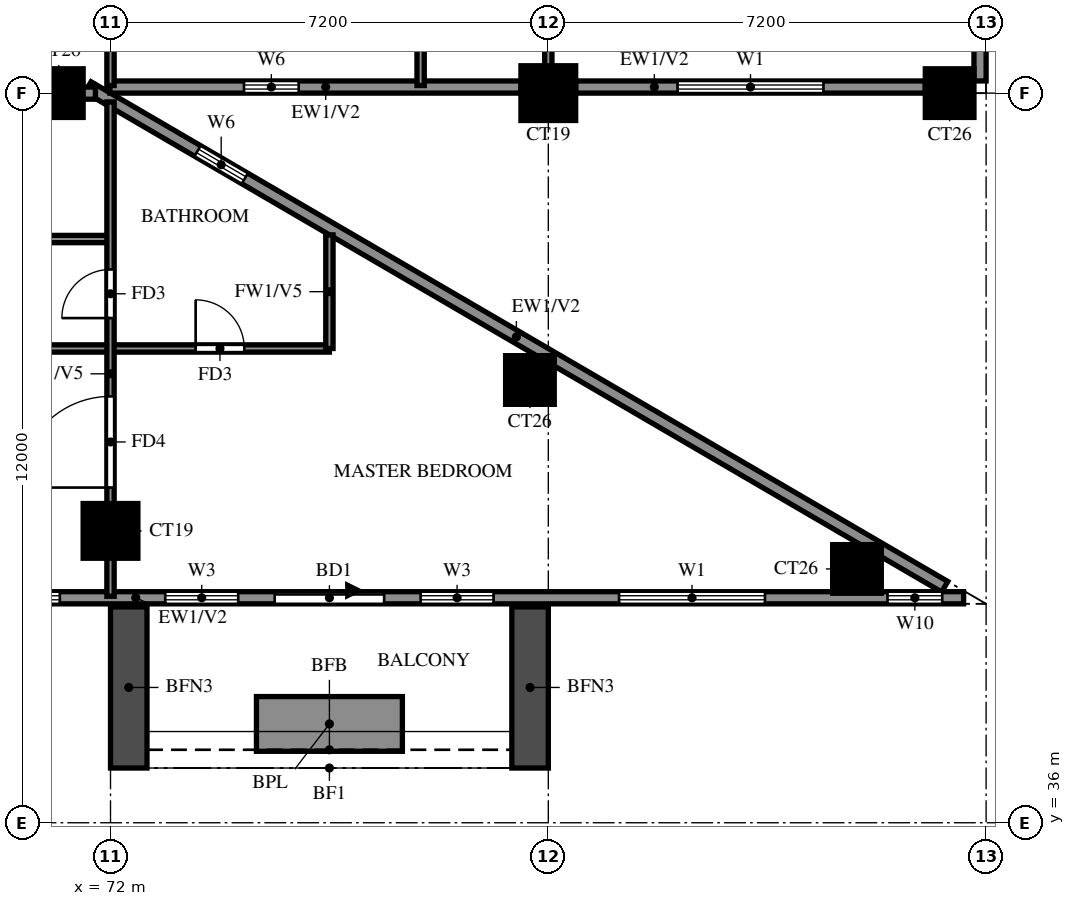
"""IFC4 building model, lengths in metres.
Left out: names, types, materials, properties, quantities, classifications, styles, units other than length and angle.
Written with IfcOpenShell. Run it as: python <this file> out.ifc"""

import sys

from ifc_helpers import new_model, si_unit, direction, frame, frame_2d, origin, origin_2d, place, context, subcontext, project, spatial, rectangle, extrude, source, transform, mapped, element, fill, save


model = new_model("IFC4")
c1 = context("Model", 3, precision=1e-05, world=origin(), true_north=direction((0.0, 1.0)))
c2 = subcontext(c1, "Body", "Model", "MODEL_VIEW")
j1 = project(units=[si_unit("LENGTHUNIT", "METRE"), si_unit("PLANEANGLEUNIT", "RADIAN")], contexts=[c1])
p1 = place(None, origin())
s1 = spatial("IfcSite", under=j1, at=p1, CompositionType="ELEMENT")
p2 = place(p1, origin())
s2 = spatial("IfcBuilding", under=s1, at=p2, CompositionType="ELEMENT")
p3 = place(p2, frame((0.0, 0.0, 199.0)))
s3 = spatial("IfcBuildingStorey", under=s2, at=p3, CompositionType="ELEMENT", Elevation=199.0)
m1 = source(origin(), c2, "Body", "SweptSolid", [
    extrude(rectangle(XDim=0.8, YDim=0.8, at=origin_2d()), origin(), (0.0, 0.0, 1.0), 3.2),
])
p4 = place(p3, frame((84.276, 40.174, 0.0), z_axis=(0.0, 0.0, 1.0), x_axis=(1.0, 0.0, 0.0)))
e1 = element("IfcColumn", 1, at=p4, inside=s3, PredefinedType="COLUMN", context=c2, shape_type="MappedRepresentation", body=[
    mapped(m1, transform((0.0, 0.0, 0.0))),
])
m2 = source(origin(), c2, "Body", "SweptSolid", [
    extrude(rectangle(XDim=0.9, YDim=0.9, at=origin_2d()), origin(), (0.0, 0.0, 1.0), 3.2),
])
p5 = place(p3, frame((72.0, 40.8, 0.0), z_axis=(0.0, 0.0, 1.0), x_axis=(1.0, 0.0, 0.0)))
e2 = element("IfcColumn", 2, at=p5, inside=s3, PredefinedType="COLUMN", context=c2, shape_type="MappedRepresentation", body=[
    mapped(m2, transform((0.0, 0.0, 0.0))),
])
for number, where, z_axis, x_axis in (
    (3, (78.898, 43.282, 0.0), (0.0, 0.0, 1.0), (1.0, 0.0, 0.0)),
    (4, (71.15, 48.0, 0.0), (0.0, 0.0, 1.0), (1.0, 0.0, 0.0)),
):
    element("IfcColumn", number, at=place(p3, frame(where, z_axis=z_axis, x_axis=x_axis)), inside=s3, PredefinedType="COLUMN", context=c2, shape_type="MappedRepresentation", body=[
        mapped(m1, transform((0.0, 0.0, 0.0))),
    ])
p6 = place(p3, frame((79.2, 48.0, 0.0), z_axis=(0.0, 0.0, 1.0), x_axis=(1.0, 0.0, 0.0)))
e5 = element("IfcColumn", 5, at=p6, inside=s3, PredefinedType="COLUMN", context=c2, shape_type="MappedRepresentation", body=[
    mapped(m2, transform((0.0, 0.0, 0.0))),
])
p7 = place(p3, frame((85.8, 48.0, 0.0), z_axis=(0.0, 0.0, 1.0), x_axis=(1.0, 0.0, 0.0)))
e6 = element("IfcColumn", 6, at=p7, inside=s3, PredefinedType="COLUMN", context=c2, shape_type="MappedRepresentation", body=[
    mapped(m1, transform((0.0, 0.0, 0.0))),
])
p8 = place(p3, frame((85.719, 39.881, 0.0), z_axis=(0.0, 0.0, 1.0), x_axis=(-0.86377618652, 0.503875678716, 0.0)))
e7 = element("IfcWall", 7, at=p8, inside=s3, PredefinedType="SOLIDWALL", context=c2, shape_type="SweptSolid", body=[
    extrude(rectangle(XDim=16.311, YDim=0.2, at=frame_2d((8.156, 0.0))), origin(), (0.0, 0.0, 1.0), 3.2),
])
p9 = place(p8, frame((13.326, 0.0, 1.5)))
e8 = element("IfcOpeningElement", 8, at=p9, cuts=e7, PredefinedType="OPENING", context=c2, shape_type="SweptSolid", body=[
    extrude(rectangle(XDim=0.9, YDim=0.9, at=frame_2d((0.45, 0.45))), frame((0.0, 0.11, 0.0), z_axis=(0.0, -1.0, 0.0), x_axis=(1.0, 0.0, 0.0)), (0.0, 0.0, 1.0), 0.22),
])
p10 = place(p3, frame((71.99, 48.1, 0.0), z_axis=(0.0, 0.0, 1.0), x_axis=(1.0, 0.0, 0.0)))
e9 = element("IfcWall", 9, at=p10, inside=s3, PredefinedType="SOLIDWALL", context=c2, shape_type="SweptSolid", body=[
    extrude(rectangle(XDim=6.76, YDim=0.2, at=frame_2d((3.38, 0.0))), origin(), (0.0, 0.0, 1.0), 3.2),
])
p11 = place(p10, frame((2.205, 0.0, 1.5)))
e10 = element("IfcOpeningElement", 10, at=p11, cuts=e9, PredefinedType="OPENING", context=c2, shape_type="SweptSolid", body=[
    extrude(rectangle(XDim=0.9, YDim=0.9, at=frame_2d((0.45, 0.45))), frame((0.0, 0.11, 0.0), z_axis=(0.0, -1.0, 0.0), x_axis=(1.0, 0.0, 0.0)), (0.0, 0.0, 1.0), 0.22),
])
p12 = place(p3, frame((79.65, 48.1, 0.0), z_axis=(0.0, 0.0, 1.0), x_axis=(1.0, 0.0, 0.0)))
e11 = element("IfcWall", 11, at=p12, inside=s3, PredefinedType="SOLIDWALL", context=c2, shape_type="SweptSolid", body=[
    extrude(rectangle(XDim=5.75, YDim=0.2, at=frame_2d((2.875, 0.0))), origin(), (0.0, 0.0, 1.0), 3.2),
])
p13 = place(p12, frame((1.675, 0.0, 0.6)))
e12 = element("IfcOpeningElement", 12, at=p13, cuts=e11, PredefinedType="OPENING", context=c2, shape_type="SweptSolid", body=[
    extrude(rectangle(XDim=2.4, YDim=2.4, at=frame_2d((1.2, 1.2))), frame((0.0, 0.11, 0.0), z_axis=(0.0, -1.0, 0.0), x_axis=(1.0, 0.0, 0.0)), (0.0, 0.0, 1.0), 0.22),
])
p14 = place(p3, frame((86.3, 48.2, 0.0), z_axis=(0.0, 0.0, 1.0), x_axis=(0.0, 1.0, 0.0)))
e13 = element("IfcWall", 13, at=p14, inside=s3, PredefinedType="SOLIDWALL", context=c2, shape_type="SweptSolid", body=[
    extrude(rectangle(XDim=28.6, YDim=0.2, at=frame_2d((14.3, 0.0))), origin(), (0.0, 0.0, 1.0), 3.2),
])
p15 = place(p14, frame((11.5, 0.0, 0.0)))
e14 = element("IfcOpeningElement", 14, at=p15, cuts=e13, PredefinedType="OPENING", context=c2, shape_type="SweptSolid", body=[
    extrude(rectangle(XDim=1.8, YDim=2.4, at=frame_2d((0.9, 1.2))), frame((0.0, 0.11, 0.0), z_axis=(0.0, -1.0, 0.0), x_axis=(1.0, 0.0, 0.0)), (0.0, 0.0, 1.0), 0.22),
])
p16 = place(p14, frame((0.6, 0.0, 0.6)))
e15 = element("IfcOpeningElement", 15, at=p16, cuts=e13, PredefinedType="OPENING", context=c2, shape_type="SweptSolid", body=[
    extrude(rectangle(XDim=2.4, YDim=2.4, at=frame_2d((1.2, 1.2))), frame((0.0, 0.11, 0.0), z_axis=(0.0, -1.0, 0.0), x_axis=(1.0, 0.0, 0.0)), (0.0, 0.0, 1.0), 0.22),
])
p17 = place(p14, frame((4.575, 0.0, 1.5)))
e16 = element("IfcOpeningElement", 16, at=p17, cuts=e13, PredefinedType="OPENING", context=c2, shape_type="SweptSolid", body=[
    extrude(rectangle(XDim=0.9, YDim=0.9, at=frame_2d((0.45, 0.45))), frame((0.0, 0.11, 0.0), z_axis=(0.0, -1.0, 0.0), x_axis=(1.0, 0.0, 0.0)), (0.0, 0.0, 1.0), 0.22),
])
p18 = place(p14, frame((7.475, 0.0, 0.6)))
e17 = element("IfcOpeningElement", 17, at=p18, cuts=e13, PredefinedType="OPENING", context=c2, shape_type="SweptSolid", body=[
    extrude(rectangle(XDim=1.8, YDim=2.4, at=frame_2d((0.9, 1.2))), frame((0.0, 0.11, 0.0), z_axis=(0.0, -1.0, 0.0), x_axis=(1.0, 0.0, 0.0)), (0.0, 0.0, 1.0), 0.22),
])
p19 = place(p14, frame((10.15, 0.0, 0.6)))
e18 = element("IfcOpeningElement", 18, at=p19, cuts=e13, PredefinedType="OPENING", context=c2, shape_type="SweptSolid", body=[
    extrude(rectangle(XDim=0.9, YDim=2.4, at=frame_2d((0.45, 1.2))), frame((0.0, 0.11, 0.0), z_axis=(0.0, -1.0, 0.0), x_axis=(1.0, 0.0, 0.0)), (0.0, 0.0, 1.0), 0.22),
])
p20 = place(p14, frame((14.675, 0.0, 0.6)))
e19 = element("IfcOpeningElement", 19, at=p20, cuts=e13, PredefinedType="OPENING", context=c2, shape_type="SweptSolid", body=[
    extrude(rectangle(XDim=1.2, YDim=2.4, at=frame_2d((0.6, 1.2))), frame((0.0, 0.11, 0.0), z_axis=(0.0, -1.0, 0.0), x_axis=(1.0, 0.0, 0.0)), (0.0, 0.0, 1.0), 0.22),
])
p21 = place(p14, frame((16.75, 0.0, 0.6)))
e20 = element("IfcOpeningElement", 20, at=p21, cuts=e13, PredefinedType="OPENING", context=c2, shape_type="SweptSolid", body=[
    extrude(rectangle(XDim=0.9, YDim=2.4, at=frame_2d((0.45, 1.2))), frame((0.0, 0.11, 0.0), z_axis=(0.0, -1.0, 0.0), x_axis=(1.0, 0.0, 0.0)), (0.0, 0.0, 1.0), 0.22),
])
p22 = place(p14, frame((18.975, 0.0, 1.5)))
e21 = element("IfcOpeningElement", 21, at=p22, cuts=e13, PredefinedType="OPENING", context=c2, shape_type="SweptSolid", body=[
    extrude(rectangle(XDim=0.9, YDim=0.9, at=frame_2d((0.45, 0.45))), frame((0.0, 0.11, 0.0), z_axis=(0.0, -1.0, 0.0), x_axis=(1.0, 0.0, 0.0)), (0.0, 0.0, 1.0), 0.22),
])
p23 = place(p14, frame((22.175, 0.0, 0.6)))
e22 = element("IfcOpeningElement", 22, at=p23, cuts=e13, PredefinedType="OPENING", context=c2, shape_type="SweptSolid", body=[
    extrude(rectangle(XDim=2.4, YDim=2.4, at=frame_2d((1.2, 1.2))), frame((0.0, 0.11, 0.0), z_axis=(0.0, -1.0, 0.0), x_axis=(1.0, 0.0, 0.0)), (0.0, 0.0, 1.0), 0.22),
])
p24 = place(p14, frame((25.425, 0.0, 0.6)))
e23 = element("IfcOpeningElement", 23, at=p24, cuts=e13, PredefinedType="OPENING", context=c2, shape_type="SweptSolid", body=[
    extrude(rectangle(XDim=2.4, YDim=2.4, at=frame_2d((1.2, 1.2))), frame((0.0, 0.11, 0.0), z_axis=(0.0, -1.0, 0.0), x_axis=(1.0, 0.0, 0.0)), (0.0, 0.0, 1.0), 0.22),
])
p25 = place(p3, frame((58.8, 39.7, 0.0), z_axis=(0.0, 0.0, 1.0), x_axis=(1.0, 0.0, 0.0)))
e24 = element("IfcWall", 24, at=p25, inside=s3, PredefinedType="SOLIDWALL", context=c2, shape_type="SweptSolid", body=[
    extrude(rectangle(XDim=27.23, YDim=0.2, at=frame_2d((13.615, 0.0))), origin(), (0.0, 0.0, 1.0), 3.2),
])
p26 = place(p25, frame((15.9, 0.0, 0.0)))
e25 = element("IfcOpeningElement", 25, at=p26, cuts=e24, PredefinedType="OPENING", context=c2, shape_type="SweptSolid", body=[
    extrude(rectangle(XDim=1.8, YDim=2.4, at=frame_2d((0.9, 1.2))), frame((0.0, 0.11, 0.0), z_axis=(0.0, -1.0, 0.0), x_axis=(1.0, 0.0, 0.0)), (0.0, 0.0, 1.0), 0.22),
])
p27 = place(p25, frame((6.833, 0.0, 0.6)))
e26 = element("IfcOpeningElement", 26, at=p27, cuts=e24, PredefinedType="OPENING", context=c2, shape_type="SweptSolid", body=[
    extrude(rectangle(XDim=2.4, YDim=2.4, at=frame_2d((1.2, 1.2))), frame((0.0, 0.11, 0.0), z_axis=(0.0, -1.0, 0.0), x_axis=(1.0, 0.0, 0.0)), (0.0, 0.0, 1.0), 0.22),
])
p28 = place(p25, frame((9.967, 0.0, 0.6)))
e27 = element("IfcOpeningElement", 27, at=p28, cuts=e24, PredefinedType="OPENING", context=c2, shape_type="SweptSolid", body=[
    extrude(rectangle(XDim=2.4, YDim=2.4, at=frame_2d((1.2, 1.2))), frame((0.0, 0.11, 0.0), z_axis=(0.0, -1.0, 0.0), x_axis=(1.0, 0.0, 0.0)), (0.0, 0.0, 1.0), 0.22),
])
p29 = place(p25, frame((14.1, 0.0, 0.6)))
e28 = element("IfcOpeningElement", 28, at=p29, cuts=e24, PredefinedType="OPENING", context=c2, shape_type="SweptSolid", body=[
    extrude(rectangle(XDim=1.2, YDim=2.4, at=frame_2d((0.6, 1.2))), frame((0.0, 0.11, 0.0), z_axis=(0.0, -1.0, 0.0), x_axis=(1.0, 0.0, 0.0)), (0.0, 0.0, 1.0), 0.22),
])
p30 = place(p25, frame((18.3, 0.0, 0.6)))
e29 = element("IfcOpeningElement", 29, at=p30, cuts=e24, PredefinedType="OPENING", context=c2, shape_type="SweptSolid", body=[
    extrude(rectangle(XDim=1.2, YDim=2.4, at=frame_2d((0.6, 1.2))), frame((0.0, 0.11, 0.0), z_axis=(0.0, -1.0, 0.0), x_axis=(1.0, 0.0, 0.0)), (0.0, 0.0, 1.0), 0.22),
])
p31 = place(p25, frame((21.563, 0.0, 0.6)))
e30 = element("IfcOpeningElement", 30, at=p31, cuts=e24, PredefinedType="OPENING", context=c2, shape_type="SweptSolid", body=[
    extrude(rectangle(XDim=2.4, YDim=2.4, at=frame_2d((1.2, 1.2))), frame((0.0, 0.11, 0.0), z_axis=(0.0, -1.0, 0.0), x_axis=(1.0, 0.0, 0.0)), (0.0, 0.0, 1.0), 0.22),
])
p32 = place(p25, frame((25.978, 0.0, 0.6)))
e31 = element("IfcOpeningElement", 31, at=p32, cuts=e24, PredefinedType="OPENING", context=c2, shape_type="SweptSolid", body=[
    extrude(rectangle(XDim=0.9, YDim=2.4, at=frame_2d((0.45, 1.2))), frame((0.0, 0.11, 0.0), z_axis=(0.0, -1.0, 0.0), x_axis=(1.0, 0.0, 0.0)), (0.0, 0.0, 1.0), 0.22),
])
for number, where, z_axis, x_axis in (
    (32, (72.3, 39.55, 0.0), (0.0, 0.0, 1.0), (0.0, -1.0, 0.0)),
    (33, (78.9, 39.55, 0.0), (0.0, 0.0, 1.0), (0.0, -1.0, 0.0)),
):
    element("IfcWall", number, at=place(p3, frame(where, z_axis=z_axis, x_axis=x_axis)), inside=s3, PredefinedType="SOLIDWALL", context=c2, shape_type="SweptSolid", body=[
        extrude(rectangle(XDim=2.65, YDim=0.6, at=frame_2d((1.325, 0.0))), origin(), (0.0, 0.0, 1.0), 2.85),
    ])
p33 = place(p3, frame((74.4, 37.625, 0.0), z_axis=(0.0, 0.0, 1.0), x_axis=(1.0, 0.0, 0.0)))
e34 = element("IfcWall", 34, at=p33, inside=s3, PredefinedType="SOLIDWALL", context=c2, shape_type="SweptSolid", body=[
    extrude(rectangle(XDim=2.4, YDim=0.9, at=frame_2d((1.2, 0.0))), origin(), (0.0, 0.0, 1.0), 0.9),
])
p34 = place(p3, frame((67.2, 48.0, 0.0), z_axis=(0.0, 0.0, 1.0), x_axis=(1.0, 0.0, 0.0)))
e35 = element("IfcWall", 35, at=p34, inside=s3, PredefinedType="SOLIDWALL", context=c2, shape_type="SweptSolid", body=[
    extrude(rectangle(XDim=4.552, YDim=0.2, at=frame_2d((2.276, 0.0))), origin(), (0.0, 0.0, 1.0), 3.2),
])
p35 = place(p3, frame((60.0, 43.8, 0.0), z_axis=(0.0, 0.0, 1.0), x_axis=(1.0, 0.0, 0.0)))
e36 = element("IfcWall", 36, at=p35, inside=s3, PredefinedType="PARTITIONING", context=c2, shape_type="SweptSolid", body=[
    extrude(rectangle(XDim=15.6, YDim=0.12, at=frame_2d((7.8, 0.0))), origin(), (0.0, 0.0, 1.0), 3.2),
])
p36 = place(p35, frame((7.65, 0.0, 0.0)))
e37 = element("IfcOpeningElement", 37, at=p36, cuts=e36, PredefinedType="OPENING", context=c2, shape_type="SweptSolid", body=[
    extrude(rectangle(XDim=1.5, YDim=2.1, at=frame_2d((0.75, 1.05))), frame((0.0, 0.07, 0.0), z_axis=(0.0, -1.0, 0.0), x_axis=(1.0, 0.0, 0.0)), (0.0, 0.0, 1.0), 0.14),
])
p37 = place(p35, frame((1.95, 0.0, 0.0)))
e38 = element("IfcOpeningElement", 38, at=p37, cuts=e36, PredefinedType="OPENING", context=c2, shape_type="SweptSolid", body=[
    extrude(rectangle(XDim=0.9, YDim=2.1, at=frame_2d((0.45, 1.05))), frame((0.0, 0.07, 0.0), z_axis=(0.0, -1.0, 0.0), x_axis=(1.0, 0.0, 0.0)), (0.0, 0.0, 1.0), 0.14),
])
p38 = place(p35, frame((13.4, 0.0, 0.0)))
e39 = element("IfcOpeningElement", 39, at=p38, cuts=e36, PredefinedType="OPENING", context=c2, shape_type="SweptSolid", body=[
    extrude(rectangle(XDim=0.8, YDim=2.1, at=frame_2d((0.4, 1.05))), frame((0.0, 0.07, 0.0), z_axis=(0.0, -1.0, 0.0), x_axis=(1.0, 0.0, 0.0)), (0.0, 0.0, 1.0), 0.14),
])
p39 = place(p3, frame((67.2, 45.6, 0.0), z_axis=(0.0, 0.0, 1.0), x_axis=(1.0, 0.0, 0.0)))
e40 = element("IfcWall", 40, at=p39, inside=s3, PredefinedType="PARTITIONING", context=c2, shape_type="SweptSolid", body=[
    extrude(rectangle(XDim=4.8, YDim=0.12, at=frame_2d((2.4, 0.0))), origin(), (0.0, 0.0, 1.0), 3.2),
])
p40 = place(p39, frame((1.95, 0.0, 0.0)))
e41 = element("IfcOpeningElement", 41, at=p40, cuts=e40, PredefinedType="OPENING", context=c2, shape_type="SweptSolid", body=[
    extrude(rectangle(XDim=0.9, YDim=2.1, at=frame_2d((0.45, 1.05))), frame((0.0, 0.07, 0.0), z_axis=(0.0, -1.0, 0.0), x_axis=(1.0, 0.0, 0.0)), (0.0, 0.0, 1.0), 0.14),
])
p41 = place(p3, frame((72.0, 39.725, 0.0), z_axis=(0.0, 0.0, 1.0), x_axis=(0.0, 1.0, 0.0)))
e42 = element("IfcWall", 42, at=p41, inside=s3, PredefinedType="PARTITIONING", context=c2, shape_type="SweptSolid", body=[
    extrude(rectangle(XDim=8.13, YDim=0.12, at=frame_2d((4.065, 0.0))), origin(), (0.0, 0.0, 1.0), 2.3),
])
p42 = place(p41, frame((1.788, 0.0, 0.0)))
e43 = element("IfcOpeningElement", 43, at=p42, cuts=e42, PredefinedType="OPENING", context=c2, shape_type="SweptSolid", body=[
    extrude(rectangle(XDim=1.5, YDim=2.1, at=frame_2d((0.75, 1.05))), frame((0.0, 0.07, 0.0), z_axis=(0.0, -1.0, 0.0), x_axis=(1.0, 0.0, 0.0)), (0.0, 0.0, 1.0), 0.14),
])
p43 = place(p41, frame((4.575, 0.0, 0.0)))
e44 = element("IfcOpeningElement", 44, at=p43, cuts=e42, PredefinedType="OPENING", context=c2, shape_type="SweptSolid", body=[
    extrude(rectangle(XDim=0.8, YDim=2.1, at=frame_2d((0.4, 1.05))), frame((0.0, 0.07, 0.0), z_axis=(0.0, -1.0, 0.0), x_axis=(1.0, 0.0, 0.0)), (0.0, 0.0, 1.0), 0.14),
])
p44 = place(p3, frame((72.0, 48.125, 0.0), z_axis=(0.0, 0.0, 1.0), x_axis=(0.0, 1.0, 0.0)))
e45 = element("IfcWall", 45, at=p44, inside=s3, PredefinedType="PARTITIONING", context=c2, shape_type="SweptSolid", body=[
    extrude(rectangle(XDim=5.875, YDim=0.12, at=frame_2d((2.938, 0.0))), origin(), (0.0, 0.0, 1.0), 3.2),
])
p45 = place(p3, frame((75.6, 43.8, 0.0), z_axis=(0.0, 0.0, 1.0), x_axis=(0.0, 1.0, 0.0)))
e46 = element("IfcWall", 46, at=p45, inside=s3, PredefinedType="PARTITIONING", context=c2, shape_type="SweptSolid", body=[
    extrude(rectangle(XDim=1.868, YDim=0.12, at=frame_2d((0.934, 0.0))), origin(), (0.0, 0.0, 1.0), 2.3),
])
p46 = place(p3, frame((77.1, 48.125, 0.0), z_axis=(0.0, 0.0, 1.0), x_axis=(0.0, 1.0, 0.0)))
e47 = element("IfcWall", 47, at=p46, inside=s3, PredefinedType="PARTITIONING", context=c2, shape_type="SweptSolid", body=[
    extrude(rectangle(XDim=5.875, YDim=0.12, at=frame_2d((2.938, 0.0))), origin(), (0.0, 0.0, 1.0), 3.2),
])
p47 = place(p46, frame((1.363, 0.0, 0.0)))
e48 = element("IfcOpeningElement", 48, at=p47, cuts=e47, PredefinedType="OPENING", context=c2, shape_type="SweptSolid", body=[
    extrude(rectangle(XDim=0.8, YDim=2.1, at=frame_2d((0.4, 1.05))), frame((0.0, 0.07, 0.0), z_axis=(0.0, -1.0, 0.0), x_axis=(1.0, 0.0, 0.0)), (0.0, 0.0, 1.0), 0.14),
])
p48 = place(p3, frame((79.2, 48.125, 0.0), z_axis=(0.0, 0.0, 1.0), x_axis=(0.0, 1.0, 0.0)))
e49 = element("IfcWall", 49, at=p48, inside=s3, PredefinedType="PARTITIONING", context=c2, shape_type="SweptSolid", body=[
    extrude(rectangle(XDim=3.475, YDim=0.12, at=frame_2d((1.738, 0.0))), origin(), (0.0, 0.0, 1.0), 3.2),
])
p49 = place(p48, frame((1.288, 0.0, 0.0)))
e50 = element("IfcOpeningElement", 50, at=p49, cuts=e49, PredefinedType="OPENING", context=c2, shape_type="SweptSolid", body=[
    extrude(rectangle(XDim=0.9, YDim=2.1, at=frame_2d((0.45, 1.05))), frame((0.0, 0.07, 0.0), z_axis=(0.0, -1.0, 0.0), x_axis=(1.0, 0.0, 0.0)), (0.0, 0.0, 1.0), 0.14),
])
p50 = place(p9, origin())
e51 = element("IfcWindow", 51, at=p50, inside=s3, PartitioningType="SINGLE_PANEL", PredefinedType="WINDOW", context=c2, shape_type="SweptSolid", body=[
    extrude(rectangle(XDim=0.9, YDim=0.9, at=frame_2d((0.45, 0.45))), frame((0.0, 0.03, 0.0), z_axis=(0.0, -1.0, 0.0), x_axis=(1.0, 0.0, 0.0)), (0.0, 0.0, 1.0), 0.06),
])
fill(e8, e51)
p51 = place(p11, origin())
e52 = element("IfcWindow", 52, at=p51, inside=s3, PartitioningType="SINGLE_PANEL", PredefinedType="WINDOW", context=c2, shape_type="SweptSolid", body=[
    extrude(rectangle(XDim=0.9, YDim=0.9, at=frame_2d((0.45, 0.45))), frame((0.0, 0.03, 0.0), z_axis=(0.0, -1.0, 0.0), x_axis=(1.0, 0.0, 0.0)), (0.0, 0.0, 1.0), 0.06),
])
fill(e10, e52)
p52 = place(p13, origin())
e53 = element("IfcWindow", 53, at=p52, inside=s3, PartitioningType="DOUBLE_PANEL_VERTICAL", PredefinedType="WINDOW", context=c2, shape_type="SweptSolid", body=[
    extrude(rectangle(XDim=2.4, YDim=2.4, at=frame_2d((1.2, 1.2))), frame((0.0, 0.03, 0.0), z_axis=(0.0, -1.0, 0.0), x_axis=(1.0, 0.0, 0.0)), (0.0, 0.0, 1.0), 0.06),
])
fill(e12, e53)
p53 = place(p26, origin())
e54 = element("IfcDoor", 54, at=p53, inside=s3, OperationType="DOUBLE_DOOR_SLIDING", PredefinedType="DOOR", context=c2, shape_type="SweptSolid", body=[
    extrude(rectangle(XDim=1.8, YDim=2.4, at=frame_2d((0.9, 1.2))), frame((0.0, 0.025, 0.0), z_axis=(0.0, -1.0, 0.0), x_axis=(1.0, 0.0, 0.0)), (0.0, 0.0, 1.0), 0.05),
])
fill(e25, e54)
p54 = place(p28, origin())
e55 = element("IfcWindow", 55, at=p54, inside=s3, PartitioningType="DOUBLE_PANEL_VERTICAL", PredefinedType="WINDOW", context=c2, shape_type="SweptSolid", body=[
    extrude(rectangle(XDim=2.4, YDim=2.4, at=frame_2d((1.2, 1.2))), frame((0.0, 0.03, 0.0), z_axis=(0.0, -1.0, 0.0), x_axis=(1.0, 0.0, 0.0)), (0.0, 0.0, 1.0), 0.06),
])
fill(e27, e55)
p55 = place(p29, origin())
e56 = element("IfcWindow", 56, at=p55, inside=s3, PartitioningType="SINGLE_PANEL", PredefinedType="WINDOW", context=c2, shape_type="SweptSolid", body=[
    extrude(rectangle(XDim=1.2, YDim=2.4, at=frame_2d((0.6, 1.2))), frame((0.0, 0.03, 0.0), z_axis=(0.0, -1.0, 0.0), x_axis=(1.0, 0.0, 0.0)), (0.0, 0.0, 1.0), 0.06),
])
fill(e28, e56)
p56 = place(p30, origin())
e57 = element("IfcWindow", 57, at=p56, inside=s3, PartitioningType="SINGLE_PANEL", PredefinedType="WINDOW", context=c2, shape_type="SweptSolid", body=[
    extrude(rectangle(XDim=1.2, YDim=2.4, at=frame_2d((0.6, 1.2))), frame((0.0, 0.03, 0.0), z_axis=(0.0, -1.0, 0.0), x_axis=(1.0, 0.0, 0.0)), (0.0, 0.0, 1.0), 0.06),
])
fill(e29, e57)
p57 = place(p31, origin())
e58 = element("IfcWindow", 58, at=p57, inside=s3, PartitioningType="DOUBLE_PANEL_VERTICAL", PredefinedType="WINDOW", context=c2, shape_type="SweptSolid", body=[
    extrude(rectangle(XDim=2.4, YDim=2.4, at=frame_2d((1.2, 1.2))), frame((0.0, 0.03, 0.0), z_axis=(0.0, -1.0, 0.0), x_axis=(1.0, 0.0, 0.0)), (0.0, 0.0, 1.0), 0.06),
])
fill(e30, e58)
p58 = place(p32, origin())
e59 = element("IfcWindow", 59, at=p58, inside=s3, PartitioningType="SINGLE_PANEL", PredefinedType="WINDOW", context=c2, shape_type="SweptSolid", body=[
    extrude(rectangle(XDim=0.9, YDim=2.4, at=frame_2d((0.45, 1.2))), frame((0.0, 0.03, 0.0), z_axis=(0.0, -1.0, 0.0), x_axis=(1.0, 0.0, 0.0)), (0.0, 0.0, 1.0), 0.06),
])
fill(e31, e59)
p59 = place(p42, origin())
e60 = element("IfcDoor", 60, at=p59, inside=s3, OperationType="SINGLE_SWING_RIGHT", PredefinedType="DOOR", context=c2, shape_type="SweptSolid", body=[
    extrude(rectangle(XDim=1.5, YDim=2.1, at=frame_2d((0.75, 1.05))), frame((0.0, 0.025, 0.0), z_axis=(0.0, -1.0, 0.0), x_axis=(1.0, 0.0, 0.0)), (0.0, 0.0, 1.0), 0.05),
])
fill(e43, e60)
p60 = place(p43, origin())
e61 = element("IfcDoor", 61, at=p60, inside=s3, OperationType="SINGLE_SWING_LEFT", PredefinedType="DOOR", context=c2, shape_type="SweptSolid", body=[
    extrude(rectangle(XDim=0.8, YDim=2.1, at=frame_2d((0.4, 1.05))), frame((0.0, 0.025, 0.0), z_axis=(0.0, -1.0, 0.0), x_axis=(1.0, 0.0, 0.0)), (0.0, 0.0, 1.0), 0.05),
])
fill(e44, e61)
p61 = place(p38, origin())
e62 = element("IfcDoor", 62, at=p61, inside=s3, OperationType="SINGLE_SWING_RIGHT", PredefinedType="DOOR", context=c2, shape_type="SweptSolid", body=[
    extrude(rectangle(XDim=0.8, YDim=2.1, at=frame_2d((0.4, 1.05))), frame((0.0, 0.025, 0.0), z_axis=(0.0, -1.0, 0.0), x_axis=(1.0, 0.0, 0.0)), (0.0, 0.0, 1.0), 0.05),
])
fill(e39, e62)
save(model, sys.argv[1])
